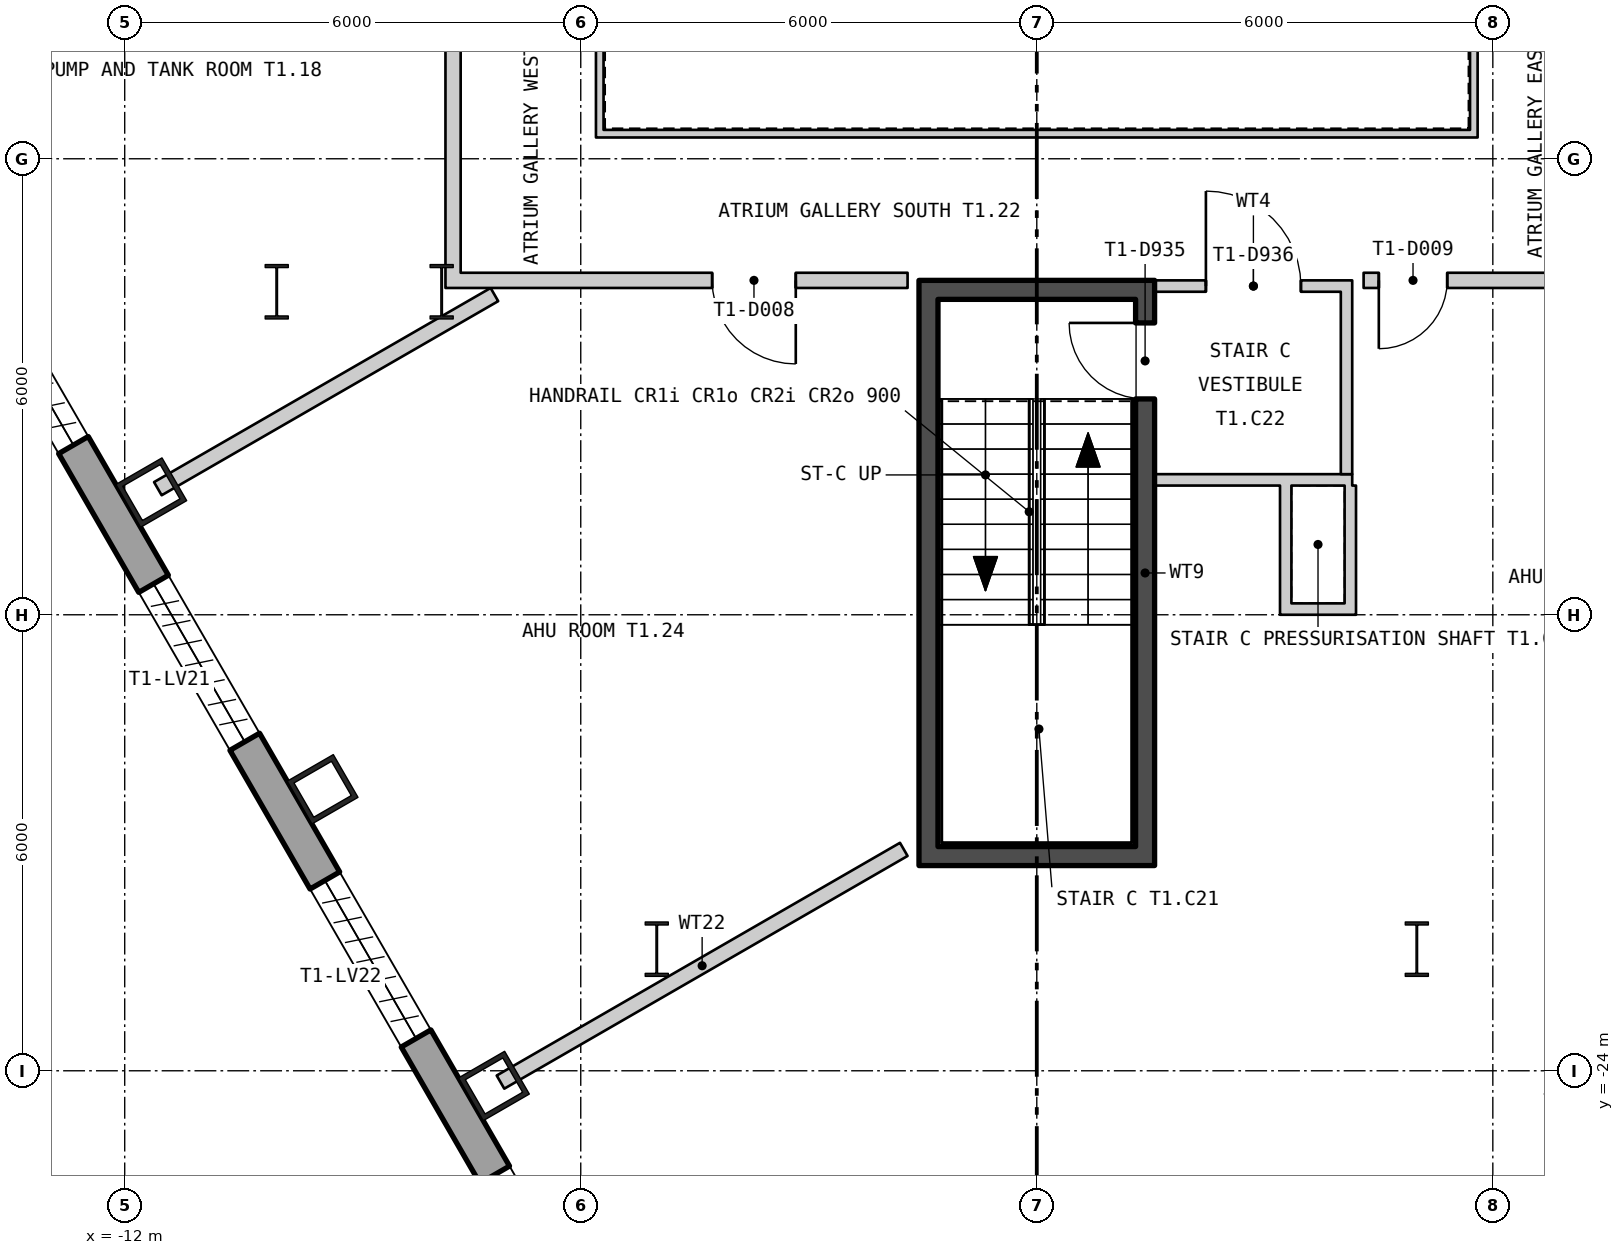
"""IFC4 building model, lengths in metres.
Left out: names, types, materials, properties, quantities, classifications, styles, units other than length and angle.
Written with IfcOpenShell. Run it as: python <this file> out.ifc"""

import sys

from ifc_helpers import new_model, si_unit, direction, frame, frame_2d, origin, origin_2d, place, context, subcontext, project, spatial, polyline, rectangle, hollow_rectangle, i_section, outline, extrude, element, fill, save


model = new_model("IFC4")
c1 = context("Model", 3, precision=1e-05, world=origin(), true_north=direction((0.0, 1.0)))
c2 = subcontext(c1, "Body", "Model", "MODEL_VIEW")
j1 = project(units=[si_unit("LENGTHUNIT", "METRE"), si_unit("PLANEANGLEUNIT", "RADIAN")], contexts=[c1])
p1 = place(None, origin())
s1 = spatial("IfcSite", under=j1, at=p1, CompositionType="ELEMENT")
p2 = place(p1, origin())
s2 = spatial("IfcBuilding", under=s1, at=p2, CompositionType="ELEMENT")
p3 = place(p2, frame((0.0, 0.0, 78.3)))
s3 = spatial("IfcBuildingStorey", under=s2, at=p3, CompositionType="ELEMENT", Elevation=78.3)
for number, where, z_axis, x_axis in (
    (1, (-11.65, -16.392, 0.0), (0.0, 0.0, 1.0), (0.5, -0.866, 0.0)),
    (2, (-9.396, -20.296, 0.0), (0.0, 0.0, 1.0), (0.5, -0.866, 0.0)),
    (3, (-7.142, -24.2, 0.0), (0.0, 0.0, 1.0), (0.5, -0.866, 0.0)),
    (4, (7.142, -24.2, 0.0), (0.0, 0.0, 1.0), (0.5, 0.866, 0.0)),
):
    element("IfcColumn", number, at=place(p3, frame(where, z_axis=z_axis, x_axis=x_axis)), inside=s3, PredefinedType="COLUMN", context=c2, shape_type="SweptSolid", body=[
        extrude(hollow_rectangle(XDim=0.65, YDim=0.7, WallThickness=0.065, at=origin_2d()), origin(), (0.0, 0.0, 1.0), 6.0),
    ])
for number, where, z_axis, x_axis in (
    (5, (-7.83, -13.75, 0.0), (0.0, 0.0, 1.0), (1.0, 0.0, 0.0)),
    (6, (5.0, -22.4, 0.0), (0.0, 0.0, 1.0), (1.0, 0.0, 0.0)),
    (7, (-5.0, -22.4, 0.0), (0.0, 0.0, 1.0), (1.0, 0.0, 0.0)),
    (8, (-10.0, -13.75, 0.0), (0.0, 0.0, 1.0), (1.0, 0.0, 0.0)),
):
    element("IfcColumn", number, at=place(p3, frame(where, z_axis=z_axis, x_axis=x_axis)), inside=s3, PredefinedType="COLUMN", context=c2, shape_type="SweptSolid", body=[
        extrude(i_section(OverallWidth=0.304, OverallDepth=0.716, WebThickness=0.021, FlangeThickness=0.04, at=origin_2d()), origin(), (0.0, 0.0, 1.0), 6.0),
    ])
p4 = place(p3, frame((-28.09, 10.934, -0.18), z_axis=(0.0, 0.0, 1.0), x_axis=(0.500000711659, -0.866024992908, 0.0)))
e9 = element("IfcWall", 9, at=p4, inside=s3, PredefinedType="SOLIDWALL", context=c2, shape_type="SweptSolid", body=[
    extrude(outline(polyline([(-0.13, -0.225), (45.87, -0.225), (45.61, 0.225), (0.13, 0.225), (-0.13, -0.225)])), origin(), (0.0, 0.0, 1.0), 6.0),
])
p5 = place(p4, frame((1.424, 0.0, 1.38)))
e10 = element("IfcOpeningElement", 10, at=p5, cuts=e9, PredefinedType="OPENING", context=c2, shape_type="SweptSolid", body=[
    extrude(rectangle(XDim=2.4, YDim=3.6, at=frame_2d((1.2, 1.8))), frame((0.0, 0.235, 0.0), z_axis=(0.0, -1.0, 0.0), x_axis=(1.0, 0.0, 0.0)), (0.0, 0.0, 1.0), 0.47),
])
p6 = place(p4, frame((5.893, 0.0, 1.38)))
e11 = element("IfcOpeningElement", 11, at=p6, cuts=e9, PredefinedType="OPENING", context=c2, shape_type="SweptSolid", body=[
    extrude(rectangle(XDim=2.4, YDim=3.6, at=frame_2d((1.2, 1.8))), frame((0.0, 0.235, 0.0), z_axis=(0.0, -1.0, 0.0), x_axis=(1.0, 0.0, 0.0)), (0.0, 0.0, 1.0), 0.47),
])
p7 = place(p4, frame((10.401, 0.0, 1.38)))
e12 = element("IfcOpeningElement", 12, at=p7, cuts=e9, PredefinedType="OPENING", context=c2, shape_type="SweptSolid", body=[
    extrude(rectangle(XDim=2.4, YDim=3.6, at=frame_2d((1.2, 1.8))), frame((0.0, 0.235, 0.0), z_axis=(0.0, -1.0, 0.0), x_axis=(1.0, 0.0, 0.0)), (0.0, 0.0, 1.0), 0.47),
])
p8 = place(p4, frame((14.909, 0.0, 1.38)))
e13 = element("IfcOpeningElement", 13, at=p8, cuts=e9, PredefinedType="OPENING", context=c2, shape_type="SweptSolid", body=[
    extrude(rectangle(XDim=2.4, YDim=3.6, at=frame_2d((1.2, 1.8))), frame((0.0, 0.235, 0.0), z_axis=(0.0, -1.0, 0.0), x_axis=(1.0, 0.0, 0.0)), (0.0, 0.0, 1.0), 0.47),
])
p9 = place(p4, frame((19.416, 0.0, 1.38)))
e14 = element("IfcOpeningElement", 14, at=p9, cuts=e9, PredefinedType="OPENING", context=c2, shape_type="SweptSolid", body=[
    extrude(rectangle(XDim=2.4, YDim=3.6, at=frame_2d((1.2, 1.8))), frame((0.0, 0.235, 0.0), z_axis=(0.0, -1.0, 0.0), x_axis=(1.0, 0.0, 0.0)), (0.0, 0.0, 1.0), 0.47),
])
p10 = place(p4, frame((23.924, 0.0, 1.38)))
e15 = element("IfcOpeningElement", 15, at=p10, cuts=e9, PredefinedType="OPENING", context=c2, shape_type="SweptSolid", body=[
    extrude(rectangle(XDim=2.4, YDim=3.6, at=frame_2d((1.2, 1.8))), frame((0.0, 0.235, 0.0), z_axis=(0.0, -1.0, 0.0), x_axis=(1.0, 0.0, 0.0)), (0.0, 0.0, 1.0), 0.47),
])
p11 = place(p4, frame((28.431, 0.0, 1.38)))
e16 = element("IfcOpeningElement", 16, at=p11, cuts=e9, PredefinedType="OPENING", context=c2, shape_type="SweptSolid", body=[
    extrude(rectangle(XDim=2.4, YDim=3.6, at=frame_2d((1.2, 1.8))), frame((0.0, 0.235, 0.0), z_axis=(0.0, -1.0, 0.0), x_axis=(1.0, 0.0, 0.0)), (0.0, 0.0, 1.0), 0.47),
])
p12 = place(p4, frame((32.939, 0.0, 1.38)))
e17 = element("IfcOpeningElement", 17, at=p12, cuts=e9, PredefinedType="OPENING", context=c2, shape_type="SweptSolid", body=[
    extrude(rectangle(XDim=2.4, YDim=3.6, at=frame_2d((1.2, 1.8))), frame((0.0, 0.235, 0.0), z_axis=(0.0, -1.0, 0.0), x_axis=(1.0, 0.0, 0.0)), (0.0, 0.0, 1.0), 0.47),
])
p13 = place(p4, frame((37.447, 0.0, 1.38)))
e18 = element("IfcOpeningElement", 18, at=p13, cuts=e9, PredefinedType="OPENING", context=c2, shape_type="SweptSolid", body=[
    extrude(rectangle(XDim=2.4, YDim=3.6, at=frame_2d((1.2, 1.8))), frame((0.0, 0.235, 0.0), z_axis=(0.0, -1.0, 0.0), x_axis=(1.0, 0.0, 0.0)), (0.0, 0.0, 1.0), 0.47),
])
p14 = place(p4, frame((41.916, 0.0, 1.38)))
e19 = element("IfcOpeningElement", 19, at=p14, cuts=e9, PredefinedType="OPENING", context=c2, shape_type="SweptSolid", body=[
    extrude(rectangle(XDim=2.4, YDim=3.6, at=frame_2d((1.2, 1.8))), frame((0.0, 0.235, 0.0), z_axis=(0.0, -1.0, 0.0), x_axis=(1.0, 0.0, 0.0)), (0.0, 0.0, 1.0), 0.47),
])
p15 = place(p3, frame((5.22, -28.679, -0.18), z_axis=(0.0, 0.0, 1.0), x_axis=(0.500000711659, 0.866024992908, 0.0)))
e20 = element("IfcWall", 20, at=p15, inside=s3, PredefinedType="SOLIDWALL", context=c2, shape_type="SweptSolid", body=[
    extrude(outline(polyline([(-0.13, -0.225), (45.87, -0.225), (45.61, 0.225), (0.13, 0.225), (-0.13, -0.225)])), origin(), (0.0, 0.0, 1.0), 6.0),
])
p16 = place(p15, frame((1.424, 0.0, 1.38)))
e21 = element("IfcOpeningElement", 21, at=p16, cuts=e20, PredefinedType="OPENING", context=c2, shape_type="SweptSolid", body=[
    extrude(rectangle(XDim=2.4, YDim=3.6, at=frame_2d((1.2, 1.8))), frame((0.0, 0.235, 0.0), z_axis=(0.0, -1.0, 0.0), x_axis=(1.0, 0.0, 0.0)), (0.0, 0.0, 1.0), 0.47),
])
p17 = place(p15, frame((5.893, 0.0, 1.38)))
e22 = element("IfcOpeningElement", 22, at=p17, cuts=e20, PredefinedType="OPENING", context=c2, shape_type="SweptSolid", body=[
    extrude(rectangle(XDim=2.4, YDim=3.6, at=frame_2d((1.2, 1.8))), frame((0.0, 0.235, 0.0), z_axis=(0.0, -1.0, 0.0), x_axis=(1.0, 0.0, 0.0)), (0.0, 0.0, 1.0), 0.47),
])
p18 = place(p15, frame((10.401, 0.0, 1.38)))
e23 = element("IfcOpeningElement", 23, at=p18, cuts=e20, PredefinedType="OPENING", context=c2, shape_type="SweptSolid", body=[
    extrude(rectangle(XDim=2.4, YDim=3.6, at=frame_2d((1.2, 1.8))), frame((0.0, 0.235, 0.0), z_axis=(0.0, -1.0, 0.0), x_axis=(1.0, 0.0, 0.0)), (0.0, 0.0, 1.0), 0.47),
])
p19 = place(p15, frame((14.909, 0.0, 1.38)))
e24 = element("IfcOpeningElement", 24, at=p19, cuts=e20, PredefinedType="OPENING", context=c2, shape_type="SweptSolid", body=[
    extrude(rectangle(XDim=2.4, YDim=3.6, at=frame_2d((1.2, 1.8))), frame((0.0, 0.235, 0.0), z_axis=(0.0, -1.0, 0.0), x_axis=(1.0, 0.0, 0.0)), (0.0, 0.0, 1.0), 0.47),
])
p20 = place(p15, frame((19.416, 0.0, 1.38)))
e25 = element("IfcOpeningElement", 25, at=p20, cuts=e20, PredefinedType="OPENING", context=c2, shape_type="SweptSolid", body=[
    extrude(rectangle(XDim=2.4, YDim=3.6, at=frame_2d((1.2, 1.8))), frame((0.0, 0.235, 0.0), z_axis=(0.0, -1.0, 0.0), x_axis=(1.0, 0.0, 0.0)), (0.0, 0.0, 1.0), 0.47),
])
p21 = place(p15, frame((23.924, 0.0, 1.38)))
e26 = element("IfcOpeningElement", 26, at=p21, cuts=e20, PredefinedType="OPENING", context=c2, shape_type="SweptSolid", body=[
    extrude(rectangle(XDim=2.4, YDim=3.6, at=frame_2d((1.2, 1.8))), frame((0.0, 0.235, 0.0), z_axis=(0.0, -1.0, 0.0), x_axis=(1.0, 0.0, 0.0)), (0.0, 0.0, 1.0), 0.47),
])
p22 = place(p15, frame((28.431, 0.0, 1.38)))
e27 = element("IfcOpeningElement", 27, at=p22, cuts=e20, PredefinedType="OPENING", context=c2, shape_type="SweptSolid", body=[
    extrude(rectangle(XDim=2.4, YDim=3.6, at=frame_2d((1.2, 1.8))), frame((0.0, 0.235, 0.0), z_axis=(0.0, -1.0, 0.0), x_axis=(1.0, 0.0, 0.0)), (0.0, 0.0, 1.0), 0.47),
])
p23 = place(p15, frame((32.939, 0.0, 1.38)))
e28 = element("IfcOpeningElement", 28, at=p23, cuts=e20, PredefinedType="OPENING", context=c2, shape_type="SweptSolid", body=[
    extrude(rectangle(XDim=2.4, YDim=3.6, at=frame_2d((1.2, 1.8))), frame((0.0, 0.235, 0.0), z_axis=(0.0, -1.0, 0.0), x_axis=(1.0, 0.0, 0.0)), (0.0, 0.0, 1.0), 0.47),
])
p24 = place(p15, frame((37.447, 0.0, 1.38)))
e29 = element("IfcOpeningElement", 29, at=p24, cuts=e20, PredefinedType="OPENING", context=c2, shape_type="SweptSolid", body=[
    extrude(rectangle(XDim=2.4, YDim=3.6, at=frame_2d((1.2, 1.8))), frame((0.0, 0.235, 0.0), z_axis=(0.0, -1.0, 0.0), x_axis=(1.0, 0.0, 0.0)), (0.0, 0.0, 1.0), 0.47),
])
p25 = place(p15, frame((41.916, 0.0, 1.38)))
e30 = element("IfcOpeningElement", 30, at=p25, cuts=e20, PredefinedType="OPENING", context=c2, shape_type="SweptSolid", body=[
    extrude(rectangle(XDim=2.4, YDim=3.6, at=frame_2d((1.2, 1.8))), frame((0.0, 0.235, 0.0), z_axis=(0.0, -1.0, 0.0), x_axis=(1.0, 0.0, 0.0)), (0.0, 0.0, 1.0), 0.47),
])
p26 = place(p3, frame((-5.8, -11.67, 0.0), z_axis=(0.0, 0.0, 1.0), x_axis=(1.0, 0.0, 0.0)))
e31 = element("IfcWall", 31, at=p26, inside=s3, PredefinedType="PARTITIONING", context=c2, shape_type="SweptSolid", body=[
    extrude(rectangle(XDim=11.6, YDim=0.1, at=frame_2d((5.8, 0.0))), origin(), (0.0, 0.0, 1.0), 5.8),
])
for number, where, z_axis, x_axis in (
    (32, (5.75, -11.62, 0.0), (0.0, 0.0, 1.0), (0.0, 1.0, 0.0)),
    (33, (-5.75, -3.58, 0.0), (0.0, 0.0, 1.0), (0.0, -1.0, 0.0)),
):
    element("IfcWall", number, at=place(p3, frame(where, z_axis=z_axis, x_axis=x_axis)), inside=s3, PredefinedType="PARTITIONING", context=c2, shape_type="SweptSolid", body=[
        extrude(rectangle(XDim=8.04, YDim=0.1, at=frame_2d((4.02, 0.0))), origin(), (0.0, 0.0, 1.0), 5.8),
    ])
p27 = place(p3, frame((-1.425, -21.05, 0.0), z_axis=(0.0, 0.0, 1.0), x_axis=(0.0, 1.0, 0.0)))
e34 = element("IfcWall", 34, at=p27, inside=s3, PredefinedType="SHEAR", context=c2, shape_type="SweptSolid", body=[
    extrude(rectangle(XDim=7.2, YDim=0.25, at=frame_2d((3.6, 0.0))), origin(), (0.0, 0.0, 1.0), 5.8),
])
p28 = place(p3, frame((1.425, -21.05, 0.0), z_axis=(0.0, 0.0, 1.0), x_axis=(0.0, 1.0, 0.0)))
e35 = element("IfcWall", 35, at=p28, inside=s3, PredefinedType="SHEAR", context=c2, shape_type="SweptSolid", body=[
    extrude(rectangle(XDim=7.2, YDim=0.25, at=frame_2d((3.6, 0.0))), origin(), (0.0, 0.0, 1.0), 5.8),
])
p29 = place(p28, frame((5.89, 0.0, 0.0)))
e36 = element("IfcOpeningElement", 36, at=p29, cuts=e35, PredefinedType="OPENING", context=c2, shape_type="SweptSolid", body=[
    extrude(rectangle(XDim=1.0, YDim=2.1, at=frame_2d((0.5, 1.05))), frame((0.0, 0.135, 0.0), z_axis=(0.0, -1.0, 0.0), x_axis=(1.0, 0.0, 0.0)), (0.0, 0.0, 1.0), 0.27),
])
for number, where, z_axis, x_axis in (
    (37, (-1.55, -21.175, 0.0), (0.0, 0.0, 1.0), (1.0, 0.0, 0.0)),
    (38, (-1.55, -13.725, 0.0), (0.0, 0.0, 1.0), (1.0, 0.0, 0.0)),
):
    element("IfcWall", number, at=place(p3, frame(where, z_axis=z_axis, x_axis=x_axis)), inside=s3, PredefinedType="SHEAR", context=c2, shape_type="SweptSolid", body=[
        extrude(rectangle(XDim=3.1, YDim=0.25, at=frame_2d((1.55, 0.0))), origin(), (0.0, 0.0, 1.0), 5.8),
    ])
p30 = place(p3, frame((1.55, -16.225, 0.0), z_axis=(0.0, 0.0, 1.0), x_axis=(1.0, 0.0, 0.0)))
e39 = element("IfcWall", 39, at=p30, inside=s3, PredefinedType="PARTITIONING", context=c2, shape_type="SweptSolid", body=[
    extrude(rectangle(XDim=2.6, YDim=0.15, at=frame_2d((1.3, 0.0))), origin(), (0.0, 0.0, 1.0), 5.8),
])
p31 = place(p3, frame((4.075, -16.15, 0.0), z_axis=(0.0, 0.0, 1.0), x_axis=(0.0, 1.0, 0.0)))
e40 = element("IfcWall", 40, at=p31, inside=s3, PredefinedType="PARTITIONING", context=c2, shape_type="SweptSolid", body=[
    extrude(rectangle(XDim=2.4, YDim=0.15, at=frame_2d((1.2, 0.0))), origin(), (0.0, 0.0, 1.0), 5.8),
])
p32 = place(p3, frame((1.55, -13.675, 0.0), z_axis=(0.0, 0.0, 1.0), x_axis=(1.0, 0.0, 0.0)))
e41 = element("IfcWall", 41, at=p32, inside=s3, PredefinedType="PARTITIONING", context=c2, shape_type="SweptSolid", body=[
    extrude(rectangle(XDim=2.6, YDim=0.15, at=frame_2d((1.3, 0.0))), origin(), (0.0, 0.0, 1.0), 4.89),
])
p33 = place(p32, frame((0.675, 0.0, 0.0)))
e42 = element("IfcOpeningElement", 42, at=p33, cuts=e41, PredefinedType="OPENING", context=c2, shape_type="SweptSolid", body=[
    extrude(rectangle(XDim=1.25, YDim=2.1, at=frame_2d((0.625, 1.05))), frame((0.0, 0.085, 0.0), z_axis=(0.0, -1.0, 0.0), x_axis=(1.0, 0.0, 0.0)), (0.0, 0.0, 1.0), 0.17),
])
p34 = place(p3, frame((3.275, -18.0, 0.0), z_axis=(0.0, 0.0, 1.0), x_axis=(0.0, 1.0, 0.0)))
e43 = element("IfcWall", 43, at=p34, inside=s3, PredefinedType="PARTITIONING", context=c2, shape_type="SweptSolid", body=[
    extrude(rectangle(XDim=1.7, YDim=0.15, at=frame_2d((0.85, 0.0))), origin(), (0.0, 0.0, 1.0), 5.2),
])
p35 = place(p3, frame((3.35, -17.925, 0.0), z_axis=(0.0, 0.0, 1.0), x_axis=(1.0, 0.0, 0.0)))
e44 = element("IfcWall", 44, at=p35, inside=s3, PredefinedType="PARTITIONING", context=c2, shape_type="SweptSolid", body=[
    extrude(rectangle(XDim=0.7, YDim=0.15, at=frame_2d((0.35, 0.0))), origin(), (0.0, 0.0, 1.0), 5.8),
])
p36 = place(p3, frame((4.125, -18.0, 0.0), z_axis=(0.0, 0.0, 1.0), x_axis=(0.0, 1.0, 0.0)))
e45 = element("IfcWall", 45, at=p36, inside=s3, PredefinedType="PARTITIONING", context=c2, shape_type="SweptSolid", body=[
    extrude(rectangle(XDim=1.7, YDim=0.15, at=frame_2d((0.85, 0.0))), origin(), (0.0, 0.0, 1.0), 5.8),
])
p37 = place(p3, frame((-11.564, -16.341, 0.0), z_axis=(0.0, 0.0, 1.0), x_axis=(0.86623769072, 0.499632127845, 0.0)))
e46 = element("IfcWall", 46, at=p37, inside=s3, PredefinedType="PARTITIONING", context=c2, shape_type="SweptSolid", body=[
    extrude(rectangle(XDim=5.112, YDim=0.2, at=frame_2d((2.556, 0.0))), origin(), (0.0, 0.0, 1.0), 5.8),
])
p38 = place(p3, frame((-7.68, -13.7, 0.0), z_axis=(0.0, 0.0, 1.0), x_axis=(0.0, 1.0, 0.0)))
e47 = element("IfcWall", 47, at=p38, inside=s3, PredefinedType="PARTITIONING", context=c2, shape_type="SweptSolid", body=[
    extrude(rectangle(XDim=10.008, YDim=0.2, at=frame_2d((5.004, 0.0))), origin(), (0.0, 0.0, 1.0), 5.2),
])
p39 = place(p38, frame((4.304, 0.0, 0.0)))
e48 = element("IfcOpeningElement", 48, at=p39, cuts=e47, PredefinedType="OPENING", context=c2, shape_type="SweptSolid", body=[
    extrude(rectangle(XDim=1.1, YDim=2.1, at=frame_2d((0.55, 1.05))), frame((0.0, 0.11, 0.0), z_axis=(0.0, -1.0, 0.0), x_axis=(1.0, 0.0, 0.0)), (0.0, 0.0, 1.0), 0.22),
])
p40 = place(p3, frame((-7.58, -13.6, 0.0), z_axis=(0.0, 0.0, 1.0), x_axis=(1.0, 0.0, 0.0)))
e49 = element("IfcWall", 49, at=p40, inside=s3, PredefinedType="PARTITIONING", context=c2, shape_type="SweptSolid", body=[
    extrude(rectangle(XDim=5.88, YDim=0.2, at=frame_2d((2.94, 0.0))), origin(), (0.0, 0.0, 1.0), 4.89),
])
p41 = place(p40, frame((3.309, 0.0, 0.0)))
e50 = element("IfcOpeningElement", 50, at=p41, cuts=e49, PredefinedType="OPENING", context=c2, shape_type="SweptSolid", body=[
    extrude(rectangle(XDim=1.1, YDim=2.1, at=frame_2d((0.55, 1.05))), frame((0.0, 0.11, 0.0), z_axis=(0.0, -1.0, 0.0), x_axis=(1.0, 0.0, 0.0)), (0.0, 0.0, 1.0), 0.22),
])
p42 = place(p3, frame((-7.056, -24.149, 0.0), z_axis=(0.0, 0.0, 1.0), x_axis=(0.866125793385, 0.499826079786, 0.0)))
e51 = element("IfcWall", 51, at=p42, inside=s3, PredefinedType="PARTITIONING", context=c2, shape_type="SweptSolid", body=[
    extrude(rectangle(XDim=6.126, YDim=0.2, at=frame_2d((3.063, 0.0))), origin(), (0.0, 0.0, 1.0), 5.8),
])
p43 = place(p3, frame((4.3, -13.6, 0.0), z_axis=(0.0, 0.0, 1.0), x_axis=(1.0, 0.0, 0.0)))
e52 = element("IfcWall", 52, at=p43, inside=s3, PredefinedType="PARTITIONING", context=c2, shape_type="SweptSolid", body=[
    extrude(rectangle(XDim=2.463, YDim=0.2, at=frame_2d((1.232, 0.0))), origin(), (0.0, 0.0, 1.0), 4.89),
])
p44 = place(p43, frame((0.2, 0.0, 0.0)))
e53 = element("IfcOpeningElement", 53, at=p44, cuts=e52, PredefinedType="OPENING", context=c2, shape_type="SweptSolid", body=[
    extrude(rectangle(XDim=0.9, YDim=2.1, at=frame_2d((0.45, 1.05))), frame((0.0, 0.11, 0.0), z_axis=(0.0, -1.0, 0.0), x_axis=(1.0, 0.0, 0.0)), (0.0, 0.0, 1.0), 0.22),
])
p45 = place(p29, origin())
e54 = element("IfcDoor", 54, at=p45, inside=s3, OperationType="SINGLE_SWING_LEFT", PredefinedType="DOOR", context=c2, shape_type="SweptSolid", body=[
    extrude(rectangle(XDim=1.0, YDim=2.1, at=frame_2d((0.5, 1.05))), frame((0.0, 0.025, 0.0), z_axis=(0.0, -1.0, 0.0), x_axis=(1.0, 0.0, 0.0)), (0.0, 0.0, 1.0), 0.05),
])
fill(e36, e54)
p46 = place(p33, origin())
e55 = element("IfcDoor", 55, at=p46, inside=s3, OperationType="SINGLE_SWING_RIGHT", PredefinedType="DOOR", context=c2, shape_type="SweptSolid", body=[
    extrude(rectangle(XDim=1.25, YDim=2.1, at=frame_2d((0.625, 1.05))), frame((0.0, 0.025, 0.0), z_axis=(0.0, -1.0, 0.0), x_axis=(1.0, 0.0, 0.0)), (0.0, 0.0, 1.0), 0.05),
])
fill(e42, e55)
p47 = place(p41, origin())
e56 = element("IfcDoor", 56, at=p47, inside=s3, OperationType="SINGLE_SWING_RIGHT", PredefinedType="DOOR", context=c2, shape_type="SweptSolid", body=[
    extrude(rectangle(XDim=1.1, YDim=2.1, at=frame_2d((0.55, 1.05))), frame((0.0, 0.025, 0.0), z_axis=(0.0, -1.0, 0.0), x_axis=(1.0, 0.0, 0.0)), (0.0, 0.0, 1.0), 0.05),
])
fill(e50, e56)
p48 = place(p44, origin())
e57 = element("IfcDoor", 57, at=p48, inside=s3, OperationType="SINGLE_SWING_LEFT", PredefinedType="DOOR", context=c2, shape_type="SweptSolid", body=[
    extrude(rectangle(XDim=0.9, YDim=2.1, at=frame_2d((0.45, 1.05))), frame((0.0, 0.025, 0.0), z_axis=(0.0, -1.0, 0.0), x_axis=(1.0, 0.0, 0.0)), (0.0, 0.0, 1.0), 0.05),
])
fill(e53, e57)
save(model, sys.argv[1])
